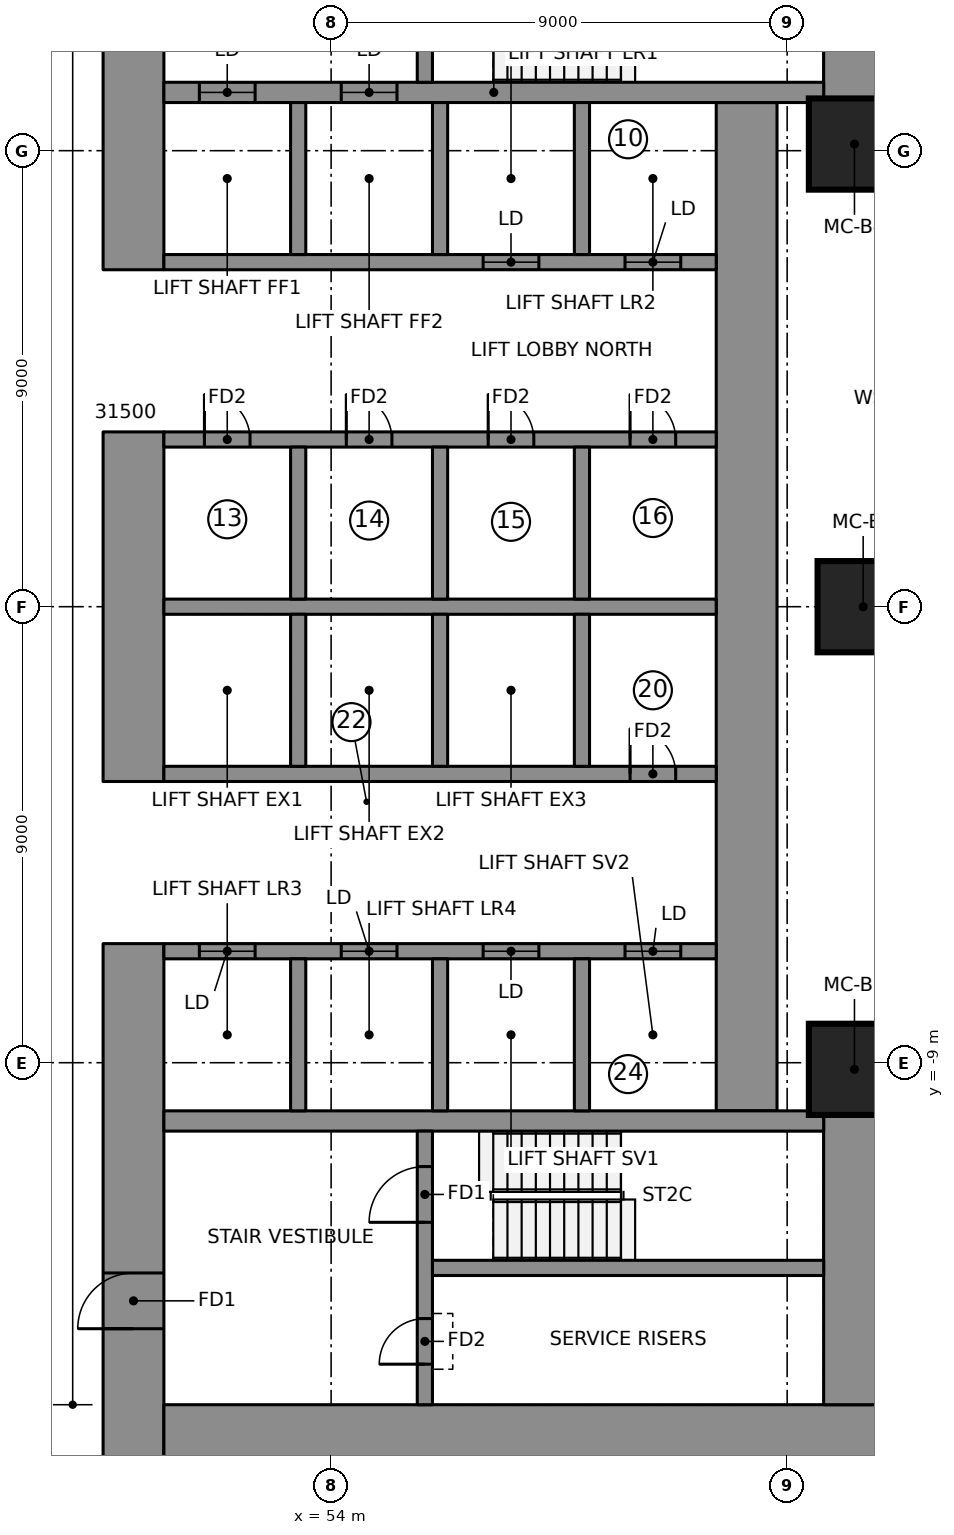
"""IFC4 building model, lengths in metres.
Left out: names, types, materials, properties, quantities, classifications, styles, units other than length and angle.
Written with IfcOpenShell. Run it as: python <this file> out.ifc"""

import sys

from ifc_helpers import new_model, si_unit, direction, frame, frame_2d, origin, origin_2d, place, context, subcontext, project, spatial, rectangle, extrude, element, fill, save


model = new_model("IFC4")
c1 = context("Model", 3, precision=1e-05, world=origin(), true_north=direction((0.0, 1.0)))
c2 = subcontext(c1, "Body", "Model", "MODEL_VIEW")
j1 = project(units=[si_unit("LENGTHUNIT", "METRE"), si_unit("PLANEANGLEUNIT", "RADIAN")], contexts=[c1])
p1 = place(None, origin())
s1 = spatial("IfcSite", under=j1, at=p1, CompositionType="ELEMENT")
p2 = place(p1, origin())
s2 = spatial("IfcBuilding", under=s1, at=p2, CompositionType="ELEMENT")
p3 = place(p2, frame((0.0, 0.0, 39.6)))
s3 = spatial("IfcBuildingStorey", under=s2, at=p3, CompositionType="ELEMENT", Elevation=39.6)
p4 = place(p3, frame((50.1, 6.65, 0.0), z_axis=(0.0, 0.0, 1.0), x_axis=(0.0, 1.0, 0.0)))
e1 = element("IfcWall", 1, at=p4, inside=s3, PredefinedType="SHEAR", context=c2, shape_type="SweptSolid", body=[
    extrude(rectangle(XDim=10.3, YDim=1.2, at=frame_2d((5.15, 0.0))), origin(), (0.0, 0.0, 1.0), 3.55),
])
p5 = place(p4, frame((6.5, 0.0, 0.0)))
e2 = element("IfcOpeningElement", 2, at=p5, cuts=e1, PredefinedType="OPENING", context=c2, shape_type="SweptSolid", body=[
    extrude(rectangle(XDim=1.1, YDim=2.1, at=frame_2d((0.55, 1.05))), frame((0.0, 0.61, 0.0), z_axis=(0.0, -1.0, 0.0), x_axis=(1.0, 0.0, 0.0)), (0.0, 0.0, 1.0), 1.22),
])
p6 = place(p3, frame((50.1, -3.45, 0.0), z_axis=(0.0, 0.0, 1.0), x_axis=(0.0, 1.0, 0.0)))
e3 = element("IfcWall", 3, at=p6, inside=s3, PredefinedType="SHEAR", context=c2, shape_type="SweptSolid", body=[
    extrude(rectangle(XDim=6.9, YDim=1.2, at=frame_2d((3.45, 0.0))), origin(), (0.0, 0.0, 1.0), 3.55),
])
p7 = place(p3, frame((50.1, -16.95, 0.0), z_axis=(0.0, 0.0, 1.0), x_axis=(0.0, 1.0, 0.0)))
e4 = element("IfcWall", 4, at=p7, inside=s3, PredefinedType="SHEAR", context=c2, shape_type="SweptSolid", body=[
    extrude(rectangle(XDim=10.3, YDim=1.2, at=frame_2d((5.15, 0.0))), origin(), (0.0, 0.0, 1.0), 3.55),
])
p8 = place(p7, frame((2.7, 0.0, 0.0)))
e5 = element("IfcOpeningElement", 5, at=p8, cuts=e4, PredefinedType="OPENING", context=c2, shape_type="SweptSolid", body=[
    extrude(rectangle(XDim=1.1, YDim=2.1, at=frame_2d((0.55, 1.05))), frame((0.0, 0.61, 0.0), z_axis=(0.0, -1.0, 0.0), x_axis=(1.0, 0.0, 0.0)), (0.0, 0.0, 1.0), 1.22),
])
p9 = place(p3, frame((50.7, -16.35, 0.0), z_axis=(0.0, 0.0, 1.0), x_axis=(1.0, 0.0, 0.0)))
e6 = element("IfcWall", 6, at=p9, inside=s3, PredefinedType="SHEAR", context=c2, shape_type="SweptSolid", body=[
    extrude(rectangle(XDim=14.22, YDim=1.2, at=frame_2d((7.11, 0.0))), origin(), (0.0, 0.0, 1.0), 3.55),
])
for number, where, z_axis, x_axis in (
    (7, (64.32, 9.95, 0.0), (0.0, 0.0, 1.0), (0.0, 1.0, 0.0)),
    (8, (64.32, -15.75, 0.0), (0.0, 0.0, 1.0), (0.0, 1.0, 0.0)),
):
    element("IfcWall", number, at=place(p3, frame(where, z_axis=z_axis, x_axis=x_axis)), inside=s3, PredefinedType="SHEAR", context=c2, shape_type="SweptSolid", body=[
        extrude(rectangle(XDim=5.8, YDim=1.2, at=frame_2d((2.9, 0.0))), origin(), (0.0, 0.0, 1.0), 3.55),
    ])
p10 = place(p3, frame((62.2, -9.95, 0.0), z_axis=(0.0, 0.0, 1.0), x_axis=(0.0, 1.0, 0.0)))
e9 = element("IfcWall", 9, at=p10, inside=s3, PredefinedType="SHEAR", context=c2, shape_type="SweptSolid", body=[
    extrude(rectangle(XDim=19.9, YDim=1.2, at=frame_2d((9.95, 0.0))), origin(), (0.0, 0.0, 1.0), 3.55),
])
p11 = place(p3, frame((50.7, 10.15, 0.0), z_axis=(0.0, 0.0, 1.0), x_axis=(1.0, 0.0, 0.0)))
e10 = element("IfcWall", 10, at=p11, inside=s3, PredefinedType="SHEAR", context=c2, shape_type="SweptSolid", body=[
    extrude(rectangle(XDim=13.02, YDim=0.4, at=frame_2d((6.51, 0.0))), origin(), (0.0, 0.0, 1.0), 3.55),
])
p12 = place(p11, frame((0.7, 0.0, 0.0)))
e11 = element("IfcOpeningElement", 11, at=p12, cuts=e10, PredefinedType="OPENING", context=c2, shape_type="SweptSolid", body=[
    extrude(rectangle(XDim=1.1, YDim=2.1, at=frame_2d((0.55, 1.05))), frame((0.0, 0.21, 0.0), z_axis=(0.0, -1.0, 0.0), x_axis=(1.0, 0.0, 0.0)), (0.0, 0.0, 1.0), 0.42),
])
p13 = place(p11, frame((3.5, 0.0, 0.0)))
e12 = element("IfcOpeningElement", 12, at=p13, cuts=e10, PredefinedType="OPENING", context=c2, shape_type="SweptSolid", body=[
    extrude(rectangle(XDim=1.1, YDim=2.1, at=frame_2d((0.55, 1.05))), frame((0.0, 0.21, 0.0), z_axis=(0.0, -1.0, 0.0), x_axis=(1.0, 0.0, 0.0)), (0.0, 0.0, 1.0), 0.42),
])
p14 = place(p3, frame((50.7, -10.15, 0.0), z_axis=(0.0, 0.0, 1.0), x_axis=(1.0, 0.0, 0.0)))
e13 = element("IfcWall", 13, at=p14, inside=s3, PredefinedType="SHEAR", context=c2, shape_type="SweptSolid", body=[
    extrude(rectangle(XDim=13.02, YDim=0.4, at=frame_2d((6.51, 0.0))), origin(), (0.0, 0.0, 1.0), 3.55),
])
p15 = place(p3, frame((50.7, 0.0, 0.0), z_axis=(0.0, 0.0, 1.0), x_axis=(1.0, 0.0, 0.0)))
e14 = element("IfcWall", 14, at=p15, inside=s3, PredefinedType="SHEAR", context=c2, shape_type="SweptSolid", body=[
    extrude(rectangle(XDim=10.9, YDim=0.3, at=frame_2d((5.45, 0.0))), origin(), (0.0, 0.0, 1.0), 3.55),
])
p16 = place(p3, frame((50.7, 3.3, 0.0), z_axis=(0.0, 0.0, 1.0), x_axis=(1.0, 0.0, 0.0)))
e15 = element("IfcWall", 15, at=p16, inside=s3, PredefinedType="SHEAR", context=c2, shape_type="SweptSolid", body=[
    extrude(rectangle(XDim=10.9, YDim=0.3, at=frame_2d((5.45, 0.0))), origin(), (0.0, 0.0, 1.0), 3.55),
])
p17 = place(p16, frame((0.8, 0.0, 0.0)))
e16 = element("IfcOpeningElement", 16, at=p17, cuts=e15, PredefinedType="OPENING", context=c2, shape_type="SweptSolid", body=[
    extrude(rectangle(XDim=0.9, YDim=2.1, at=frame_2d((0.45, 1.05))), frame((0.0, 0.16, 0.0), z_axis=(0.0, -1.0, 0.0), x_axis=(1.0, 0.0, 0.0)), (0.0, 0.0, 1.0), 0.32),
])
p18 = place(p16, frame((3.6, 0.0, 0.0)))
e17 = element("IfcOpeningElement", 17, at=p18, cuts=e15, PredefinedType="OPENING", context=c2, shape_type="SweptSolid", body=[
    extrude(rectangle(XDim=0.9, YDim=2.1, at=frame_2d((0.45, 1.05))), frame((0.0, 0.16, 0.0), z_axis=(0.0, -1.0, 0.0), x_axis=(1.0, 0.0, 0.0)), (0.0, 0.0, 1.0), 0.32),
])
p19 = place(p16, frame((6.4, 0.0, 0.0)))
e18 = element("IfcOpeningElement", 18, at=p19, cuts=e15, PredefinedType="OPENING", context=c2, shape_type="SweptSolid", body=[
    extrude(rectangle(XDim=0.9, YDim=2.1, at=frame_2d((0.45, 1.05))), frame((0.0, 0.16, 0.0), z_axis=(0.0, -1.0, 0.0), x_axis=(1.0, 0.0, 0.0)), (0.0, 0.0, 1.0), 0.32),
])
p20 = place(p16, frame((9.2, 0.0, 0.0)))
e19 = element("IfcOpeningElement", 19, at=p20, cuts=e15, PredefinedType="OPENING", context=c2, shape_type="SweptSolid", body=[
    extrude(rectangle(XDim=0.9, YDim=2.1, at=frame_2d((0.45, 1.05))), frame((0.0, 0.16, 0.0), z_axis=(0.0, -1.0, 0.0), x_axis=(1.0, 0.0, 0.0)), (0.0, 0.0, 1.0), 0.32),
])
p21 = place(p3, frame((50.7, 6.8, 0.0), z_axis=(0.0, 0.0, 1.0), x_axis=(1.0, 0.0, 0.0)))
e20 = element("IfcWall", 20, at=p21, inside=s3, PredefinedType="SHEAR", context=c2, shape_type="SweptSolid", body=[
    extrude(rectangle(XDim=10.9, YDim=0.3, at=frame_2d((5.45, 0.0))), origin(), (0.0, 0.0, 1.0), 3.55),
])
p22 = place(p21, frame((6.3, 0.0, 0.0)))
e21 = element("IfcOpeningElement", 21, at=p22, cuts=e20, PredefinedType="OPENING", context=c2, shape_type="SweptSolid", body=[
    extrude(rectangle(XDim=1.1, YDim=2.1, at=frame_2d((0.55, 1.05))), frame((0.0, 0.16, 0.0), z_axis=(0.0, -1.0, 0.0), x_axis=(1.0, 0.0, 0.0)), (0.0, 0.0, 1.0), 0.32),
])
p23 = place(p21, frame((9.1, 0.0, 0.0)))
e22 = element("IfcOpeningElement", 22, at=p23, cuts=e20, PredefinedType="OPENING", context=c2, shape_type="SweptSolid", body=[
    extrude(rectangle(XDim=1.1, YDim=2.1, at=frame_2d((0.55, 1.05))), frame((0.0, 0.16, 0.0), z_axis=(0.0, -1.0, 0.0), x_axis=(1.0, 0.0, 0.0)), (0.0, 0.0, 1.0), 0.32),
])
for number, where, z_axis, x_axis in (
    (23, (53.35, 0.15, 0.0), (0.0, 0.0, 1.0), (0.0, 1.0, 0.0)),
    (24, (53.35, 6.95, 0.0), (0.0, 0.0, 1.0), (0.0, 1.0, 0.0)),
    (25, (56.15, 0.15, 0.0), (0.0, 0.0, 1.0), (0.0, 1.0, 0.0)),
    (26, (56.15, 6.95, 0.0), (0.0, 0.0, 1.0), (0.0, 1.0, 0.0)),
    (27, (58.95, 0.15, 0.0), (0.0, 0.0, 1.0), (0.0, 1.0, 0.0)),
    (28, (58.95, 6.95, 0.0), (0.0, 0.0, 1.0), (0.0, 1.0, 0.0)),
):
    element("IfcWall", number, at=place(p3, frame(where, z_axis=z_axis, x_axis=x_axis)), inside=s3, PredefinedType="SHEAR", context=c2, shape_type="SweptSolid", body=[
        extrude(rectangle(XDim=3.0, YDim=0.3, at=frame_2d((1.5, 0.0))), origin(), (0.0, 0.0, 1.0), 3.55),
    ])
p24 = place(p3, frame((50.7, -3.3, 0.0), z_axis=(0.0, 0.0, 1.0), x_axis=(1.0, 0.0, 0.0)))
e29 = element("IfcWall", 29, at=p24, inside=s3, PredefinedType="SHEAR", context=c2, shape_type="SweptSolid", body=[
    extrude(rectangle(XDim=10.9, YDim=0.3, at=frame_2d((5.45, 0.0))), origin(), (0.0, 0.0, 1.0), 3.55),
])
p25 = place(p24, frame((9.2, 0.0, 0.0)))
e30 = element("IfcOpeningElement", 30, at=p25, cuts=e29, PredefinedType="OPENING", context=c2, shape_type="SweptSolid", body=[
    extrude(rectangle(XDim=0.9, YDim=2.1, at=frame_2d((0.45, 1.05))), frame((0.0, 0.16, 0.0), z_axis=(0.0, -1.0, 0.0), x_axis=(1.0, 0.0, 0.0)), (0.0, 0.0, 1.0), 0.32),
])
p26 = place(p3, frame((50.7, -6.8, 0.0), z_axis=(0.0, 0.0, 1.0), x_axis=(1.0, 0.0, 0.0)))
e31 = element("IfcWall", 31, at=p26, inside=s3, PredefinedType="SHEAR", context=c2, shape_type="SweptSolid", body=[
    extrude(rectangle(XDim=10.9, YDim=0.3, at=frame_2d((5.45, 0.0))), origin(), (0.0, 0.0, 1.0), 3.55),
])
p27 = place(p26, frame((0.7, 0.0, 0.0)))
e32 = element("IfcOpeningElement", 32, at=p27, cuts=e31, PredefinedType="OPENING", context=c2, shape_type="SweptSolid", body=[
    extrude(rectangle(XDim=1.1, YDim=2.1, at=frame_2d((0.55, 1.05))), frame((0.0, 0.16, 0.0), z_axis=(0.0, -1.0, 0.0), x_axis=(1.0, 0.0, 0.0)), (0.0, 0.0, 1.0), 0.32),
])
p28 = place(p26, frame((3.5, 0.0, 0.0)))
e33 = element("IfcOpeningElement", 33, at=p28, cuts=e31, PredefinedType="OPENING", context=c2, shape_type="SweptSolid", body=[
    extrude(rectangle(XDim=1.1, YDim=2.1, at=frame_2d((0.55, 1.05))), frame((0.0, 0.16, 0.0), z_axis=(0.0, -1.0, 0.0), x_axis=(1.0, 0.0, 0.0)), (0.0, 0.0, 1.0), 0.32),
])
p29 = place(p26, frame((6.3, 0.0, 0.0)))
e34 = element("IfcOpeningElement", 34, at=p29, cuts=e31, PredefinedType="OPENING", context=c2, shape_type="SweptSolid", body=[
    extrude(rectangle(XDim=1.1, YDim=2.1, at=frame_2d((0.55, 1.05))), frame((0.0, 0.16, 0.0), z_axis=(0.0, -1.0, 0.0), x_axis=(1.0, 0.0, 0.0)), (0.0, 0.0, 1.0), 0.32),
])
p30 = place(p26, frame((9.1, 0.0, 0.0)))
e35 = element("IfcOpeningElement", 35, at=p30, cuts=e31, PredefinedType="OPENING", context=c2, shape_type="SweptSolid", body=[
    extrude(rectangle(XDim=1.1, YDim=2.1, at=frame_2d((0.55, 1.05))), frame((0.0, 0.16, 0.0), z_axis=(0.0, -1.0, 0.0), x_axis=(1.0, 0.0, 0.0)), (0.0, 0.0, 1.0), 0.32),
])
for number, where, z_axis, x_axis in (
    (36, (53.35, -3.15, 0.0), (0.0, 0.0, 1.0), (0.0, 1.0, 0.0)),
    (37, (53.35, -9.95, 0.0), (0.0, 0.0, 1.0), (0.0, 1.0, 0.0)),
    (38, (56.15, -3.15, 0.0), (0.0, 0.0, 1.0), (0.0, 1.0, 0.0)),
    (39, (56.15, -9.95, 0.0), (0.0, 0.0, 1.0), (0.0, 1.0, 0.0)),
    (40, (58.95, -3.15, 0.0), (0.0, 0.0, 1.0), (0.0, 1.0, 0.0)),
    (41, (58.95, -9.95, 0.0), (0.0, 0.0, 1.0), (0.0, 1.0, 0.0)),
):
    element("IfcWall", number, at=place(p3, frame(where, z_axis=z_axis, x_axis=x_axis)), inside=s3, PredefinedType="SHEAR", context=c2, shape_type="SweptSolid", body=[
        extrude(rectangle(XDim=3.0, YDim=0.3, at=frame_2d((1.5, 0.0))), origin(), (0.0, 0.0, 1.0), 3.55),
    ])
p31 = place(p3, frame((55.85, 10.35, 0.0), z_axis=(0.0, 0.0, 1.0), x_axis=(0.0, 1.0, 0.0)))
e42 = element("IfcWall", 42, at=p31, inside=s3, PredefinedType="SHEAR", context=c2, shape_type="SweptSolid", body=[
    extrude(rectangle(XDim=5.4, YDim=0.3, at=frame_2d((2.7, 0.0))), origin(), (0.0, 0.0, 1.0), 3.55),
])
p32 = place(p31, frame((1.43, 0.0, 0.0)))
e43 = element("IfcOpeningElement", 43, at=p32, cuts=e42, PredefinedType="OPENING", context=c2, shape_type="SweptSolid", body=[
    extrude(rectangle(XDim=1.1, YDim=2.1, at=frame_2d((0.55, 1.05))), frame((0.0, 0.16, 0.0), z_axis=(0.0, -1.0, 0.0), x_axis=(1.0, 0.0, 0.0)), (0.0, 0.0, 1.0), 0.32),
])
p33 = place(p31, frame((3.6, 0.0, 0.0)))
e44 = element("IfcOpeningElement", 44, at=p33, cuts=e42, PredefinedType="OPENING", context=c2, shape_type="SweptSolid", body=[
    extrude(rectangle(XDim=1.1, YDim=2.1, at=frame_2d((0.55, 1.05))), frame((0.0, 0.16, 0.0), z_axis=(0.0, -1.0, 0.0), x_axis=(1.0, 0.0, 0.0)), (0.0, 0.0, 1.0), 0.32),
])
p34 = place(p3, frame((55.85, -15.75, 0.0), z_axis=(0.0, 0.0, 1.0), x_axis=(0.0, 1.0, 0.0)))
e45 = element("IfcWall", 45, at=p34, inside=s3, PredefinedType="SHEAR", context=c2, shape_type="SweptSolid", body=[
    extrude(rectangle(XDim=5.4, YDim=0.3, at=frame_2d((2.7, 0.0))), origin(), (0.0, 0.0, 1.0), 3.55),
])
p35 = place(p34, frame((3.6, 0.0, 0.0)))
e46 = element("IfcOpeningElement", 46, at=p35, cuts=e45, PredefinedType="OPENING", context=c2, shape_type="SweptSolid", body=[
    extrude(rectangle(XDim=1.1, YDim=2.1, at=frame_2d((0.55, 1.05))), frame((0.0, 0.16, 0.0), z_axis=(0.0, -1.0, 0.0), x_axis=(1.0, 0.0, 0.0)), (0.0, 0.0, 1.0), 0.32),
])
p36 = place(p34, frame((0.8, 0.0, 0.0)))
e47 = element("IfcOpeningElement", 47, at=p36, cuts=e45, PredefinedType="OPENING", context=c2, shape_type="SweptSolid", body=[
    extrude(rectangle(XDim=0.9, YDim=2.1, at=frame_2d((0.45, 1.05))), frame((0.0, 0.16, 0.0), z_axis=(0.0, -1.0, 0.0), x_axis=(1.0, 0.0, 0.0)), (0.0, 0.0, 1.0), 0.32),
])
p37 = place(p3, frame((56.0, -13.05, 0.0), z_axis=(0.0, 0.0, 1.0), x_axis=(1.0, 0.0, 0.0)))
e48 = element("IfcWall", 48, at=p37, inside=s3, PredefinedType="SHEAR", context=c2, shape_type="SweptSolid", body=[
    extrude(rectangle(XDim=7.72, YDim=0.3, at=frame_2d((3.86, 0.0))), origin(), (0.0, 0.0, 1.0), 3.55),
])
for number, where, z_axis, x_axis in (
    (49, (64.328, -9.131, 0.0), (0.0, 0.0, 1.0), (1.0, 0.0, 0.0)),
    (50, (64.5, 0.0, 0.0), (0.0, 0.0, 1.0), (1.0, 0.0, 0.0)),
    (51, (64.328, 9.131, 0.0), (0.0, 0.0, 1.0), (1.0, 0.0, 0.0)),
):
    element("IfcColumn", number, at=place(p3, frame(where, z_axis=z_axis, x_axis=x_axis)), inside=s3, PredefinedType="COLUMN", context=c2, shape_type="SweptSolid", body=[
        extrude(rectangle(XDim=1.8, YDim=1.8, at=origin_2d()), origin(), (0.0, 0.0, 1.0), 3.55),
    ])
p38 = place(p12, origin())
e52 = element("IfcDoor", 52, at=p38, inside=s3, OperationType="DOUBLE_DOOR_SLIDING", PredefinedType="DOOR", context=c2, shape_type="SweptSolid", body=[
    extrude(rectangle(XDim=1.1, YDim=2.1, at=frame_2d((0.55, 1.05))), frame((0.0, 0.025, 0.0), z_axis=(0.0, -1.0, 0.0), x_axis=(1.0, 0.0, 0.0)), (0.0, 0.0, 1.0), 0.05),
])
fill(e11, e52)
p39 = place(p13, origin())
e53 = element("IfcDoor", 53, at=p39, inside=s3, OperationType="DOUBLE_DOOR_SLIDING", PredefinedType="DOOR", context=c2, shape_type="SweptSolid", body=[
    extrude(rectangle(XDim=1.1, YDim=2.1, at=frame_2d((0.55, 1.05))), frame((0.0, 0.025, 0.0), z_axis=(0.0, -1.0, 0.0), x_axis=(1.0, 0.0, 0.0)), (0.0, 0.0, 1.0), 0.05),
])
fill(e12, e53)
p40 = place(p22, origin())
e54 = element("IfcDoor", 54, at=p40, inside=s3, OperationType="DOUBLE_DOOR_SLIDING", PredefinedType="DOOR", context=c2, shape_type="SweptSolid", body=[
    extrude(rectangle(XDim=1.1, YDim=2.1, at=frame_2d((0.55, 1.05))), frame((0.0, 0.025, 0.0), z_axis=(0.0, -1.0, 0.0), x_axis=(1.0, 0.0, 0.0)), (0.0, 0.0, 1.0), 0.05),
])
fill(e21, e54)
p41 = place(p23, origin())
e55 = element("IfcDoor", 55, at=p41, inside=s3, OperationType="DOUBLE_DOOR_SLIDING", PredefinedType="DOOR", context=c2, shape_type="SweptSolid", body=[
    extrude(rectangle(XDim=1.1, YDim=2.1, at=frame_2d((0.55, 1.05))), frame((0.0, 0.025, 0.0), z_axis=(0.0, -1.0, 0.0), x_axis=(1.0, 0.0, 0.0)), (0.0, 0.0, 1.0), 0.05),
])
fill(e22, e55)
p42 = place(p27, origin())
e56 = element("IfcDoor", 56, at=p42, inside=s3, OperationType="DOUBLE_DOOR_SLIDING", PredefinedType="DOOR", context=c2, shape_type="SweptSolid", body=[
    extrude(rectangle(XDim=1.1, YDim=2.1, at=frame_2d((0.55, 1.05))), frame((0.0, 0.025, 0.0), z_axis=(0.0, -1.0, 0.0), x_axis=(1.0, 0.0, 0.0)), (0.0, 0.0, 1.0), 0.05),
])
fill(e32, e56)
p43 = place(p28, origin())
e57 = element("IfcDoor", 57, at=p43, inside=s3, OperationType="DOUBLE_DOOR_SLIDING", PredefinedType="DOOR", context=c2, shape_type="SweptSolid", body=[
    extrude(rectangle(XDim=1.1, YDim=2.1, at=frame_2d((0.55, 1.05))), frame((0.0, 0.025, 0.0), z_axis=(0.0, -1.0, 0.0), x_axis=(1.0, 0.0, 0.0)), (0.0, 0.0, 1.0), 0.05),
])
fill(e33, e57)
p44 = place(p29, origin())
e58 = element("IfcDoor", 58, at=p44, inside=s3, OperationType="DOUBLE_DOOR_SLIDING", PredefinedType="DOOR", context=c2, shape_type="SweptSolid", body=[
    extrude(rectangle(XDim=1.1, YDim=2.1, at=frame_2d((0.55, 1.05))), frame((0.0, 0.025, 0.0), z_axis=(0.0, -1.0, 0.0), x_axis=(1.0, 0.0, 0.0)), (0.0, 0.0, 1.0), 0.05),
])
fill(e34, e58)
p45 = place(p30, origin())
e59 = element("IfcDoor", 59, at=p45, inside=s3, OperationType="DOUBLE_DOOR_SLIDING", PredefinedType="DOOR", context=c2, shape_type="SweptSolid", body=[
    extrude(rectangle(XDim=1.1, YDim=2.1, at=frame_2d((0.55, 1.05))), frame((0.0, 0.025, 0.0), z_axis=(0.0, -1.0, 0.0), x_axis=(1.0, 0.0, 0.0)), (0.0, 0.0, 1.0), 0.05),
])
fill(e35, e59)
p46 = place(p35, origin())
e60 = element("IfcDoor", 60, at=p46, inside=s3, OperationType="SINGLE_SWING_RIGHT", PredefinedType="DOOR", context=c2, shape_type="SweptSolid", body=[
    extrude(rectangle(XDim=1.1, YDim=2.1, at=frame_2d((0.55, 1.05))), frame((0.0, 0.025, 0.0), z_axis=(0.0, -1.0, 0.0), x_axis=(1.0, 0.0, 0.0)), (0.0, 0.0, 1.0), 0.05),
])
fill(e46, e60)
p47 = place(p8, origin())
e61 = element("IfcDoor", 61, at=p47, inside=s3, OperationType="SINGLE_SWING_RIGHT", PredefinedType="DOOR", context=c2, shape_type="SweptSolid", body=[
    extrude(rectangle(XDim=1.1, YDim=2.1, at=frame_2d((0.55, 1.05))), frame((0.0, 0.025, 0.0), z_axis=(0.0, -1.0, 0.0), x_axis=(1.0, 0.0, 0.0)), (0.0, 0.0, 1.0), 0.05),
])
fill(e5, e61)
p48 = place(p36, origin())
e62 = element("IfcDoor", 62, at=p48, inside=s3, OperationType="SINGLE_SWING_LEFT", PredefinedType="DOOR", context=c2, shape_type="SweptSolid", body=[
    extrude(rectangle(XDim=0.9, YDim=2.1, at=frame_2d((0.45, 1.05))), frame((0.0, 0.025, 0.0), z_axis=(0.0, -1.0, 0.0), x_axis=(1.0, 0.0, 0.0)), (0.0, 0.0, 1.0), 0.05),
])
fill(e47, e62)
p49 = place(p17, origin())
e63 = element("IfcDoor", 63, at=p49, inside=s3, OperationType="SINGLE_SWING_LEFT", PredefinedType="DOOR", context=c2, shape_type="SweptSolid", body=[
    extrude(rectangle(XDim=0.9, YDim=2.1, at=frame_2d((0.45, 1.05))), frame((0.0, 0.025, 0.0), z_axis=(0.0, -1.0, 0.0), x_axis=(1.0, 0.0, 0.0)), (0.0, 0.0, 1.0), 0.05),
])
fill(e16, e63)
p50 = place(p18, origin())
e64 = element("IfcDoor", 64, at=p50, inside=s3, OperationType="SINGLE_SWING_LEFT", PredefinedType="DOOR", context=c2, shape_type="SweptSolid", body=[
    extrude(rectangle(XDim=0.9, YDim=2.1, at=frame_2d((0.45, 1.05))), frame((0.0, 0.025, 0.0), z_axis=(0.0, -1.0, 0.0), x_axis=(1.0, 0.0, 0.0)), (0.0, 0.0, 1.0), 0.05),
])
fill(e17, e64)
p51 = place(p19, origin())
e65 = element("IfcDoor", 65, at=p51, inside=s3, OperationType="SINGLE_SWING_LEFT", PredefinedType="DOOR", context=c2, shape_type="SweptSolid", body=[
    extrude(rectangle(XDim=0.9, YDim=2.1, at=frame_2d((0.45, 1.05))), frame((0.0, 0.025, 0.0), z_axis=(0.0, -1.0, 0.0), x_axis=(1.0, 0.0, 0.0)), (0.0, 0.0, 1.0), 0.05),
])
fill(e18, e65)
p52 = place(p20, origin())
e66 = element("IfcDoor", 66, at=p52, inside=s3, OperationType="SINGLE_SWING_LEFT", PredefinedType="DOOR", context=c2, shape_type="SweptSolid", body=[
    extrude(rectangle(XDim=0.9, YDim=2.1, at=frame_2d((0.45, 1.05))), frame((0.0, 0.025, 0.0), z_axis=(0.0, -1.0, 0.0), x_axis=(1.0, 0.0, 0.0)), (0.0, 0.0, 1.0), 0.05),
])
fill(e19, e66)
p53 = place(p25, origin())
e67 = element("IfcDoor", 67, at=p53, inside=s3, OperationType="SINGLE_SWING_LEFT", PredefinedType="DOOR", context=c2, shape_type="SweptSolid", body=[
    extrude(rectangle(XDim=0.9, YDim=2.1, at=frame_2d((0.45, 1.05))), frame((0.0, 0.025, 0.0), z_axis=(0.0, -1.0, 0.0), x_axis=(1.0, 0.0, 0.0)), (0.0, 0.0, 1.0), 0.05),
])
fill(e30, e67)
save(model, sys.argv[1])
